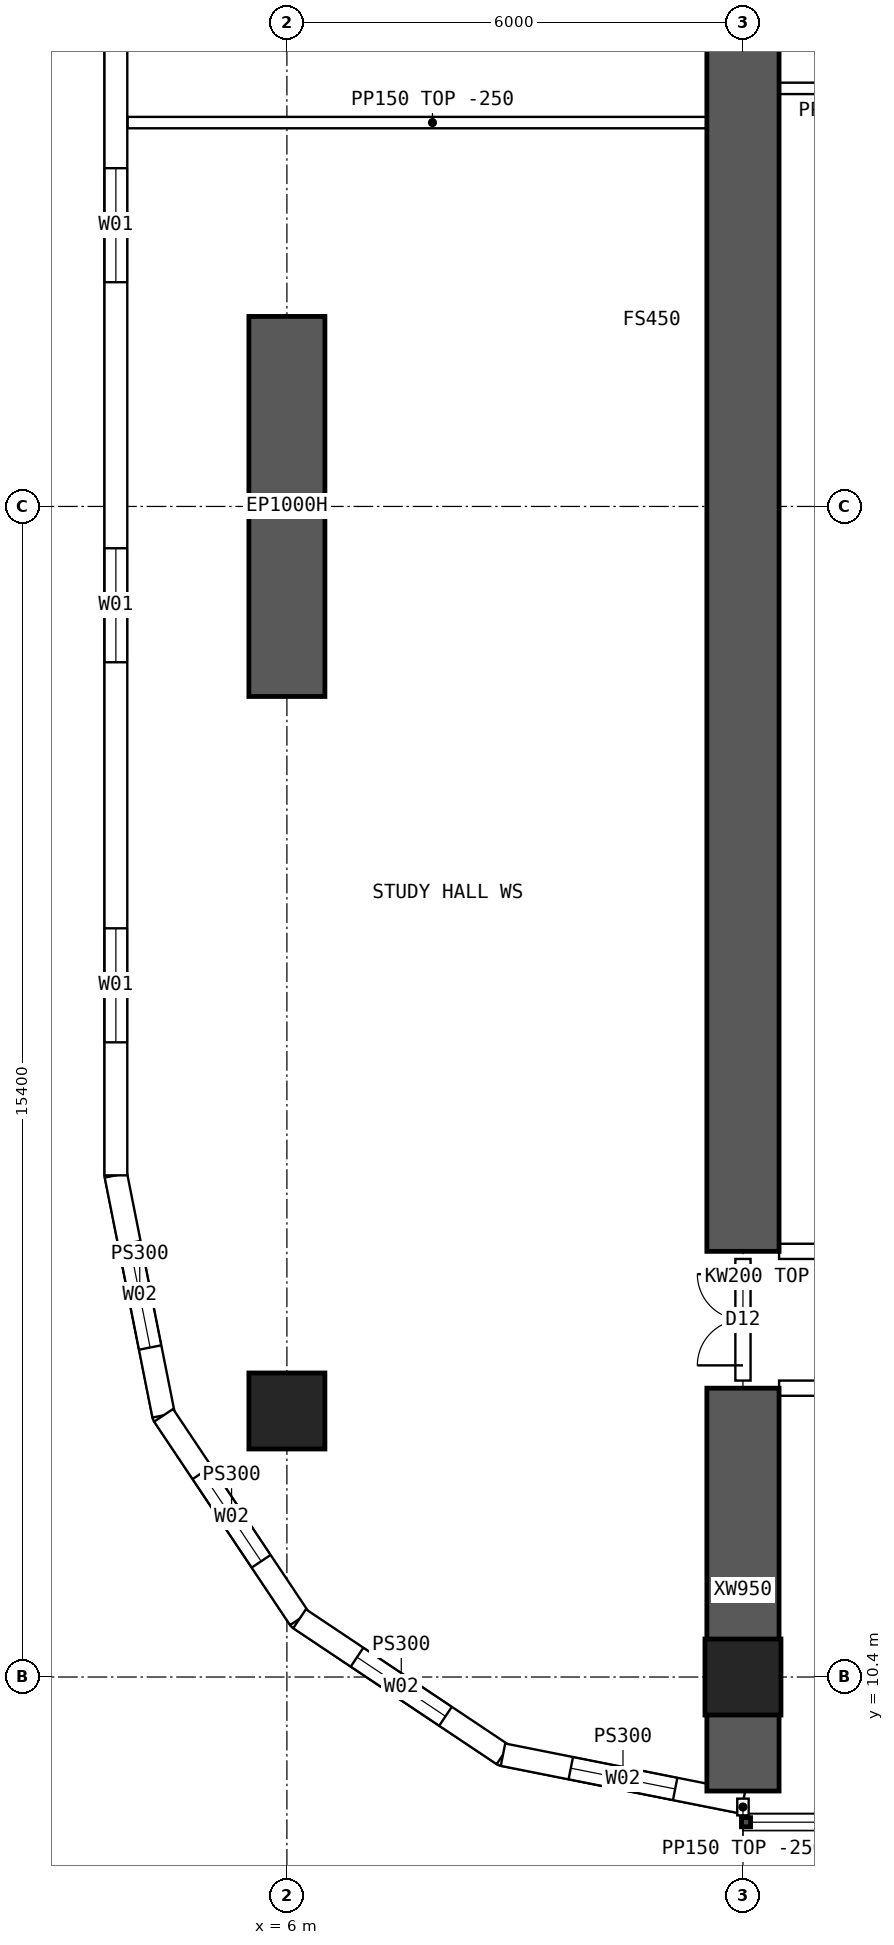
"""IFC4 building model, lengths in metres.
Left out: names, types, materials, properties, quantities, classifications, styles, units other than length and angle.
Written with IfcOpenShell. Run it as: python <this file> out.ifc"""

import sys

from ifc_helpers import new_model, si_unit, direction, frame, frame_2d, origin, origin_2d, place, context, subcontext, project, spatial, polyline, rectangle, hollow_rectangle, outline, extrude, element, fill, save


model = new_model("IFC4")
c1 = context("Model", 3, precision=1e-05, world=origin(), true_north=direction((0.0, 1.0)))
c2 = subcontext(c1, "Body", "Model", "MODEL_VIEW")
j1 = project(units=[si_unit("LENGTHUNIT", "METRE"), si_unit("PLANEANGLEUNIT", "RADIAN")], contexts=[c1])
p1 = place(None, origin())
s1 = spatial("IfcSite", under=j1, at=p1, CompositionType="ELEMENT")
p2 = place(p1, origin())
s2 = spatial("IfcBuilding", under=s1, at=p2, CompositionType="ELEMENT")
p3 = place(p2, frame((0.0, 0.0, 99.4)))
s3 = spatial("IfcBuildingStorey", under=s2, at=p3, CompositionType="ELEMENT", Elevation=99.4)
for number, where, z_axis, x_axis in (
    (1, (12.0, 10.4, 0.0), (0.0, 0.0, 1.0), (1.0, 0.0, 0.0)),
    (2, (6.0, 13.9, 0.0), (0.0, 0.0, 1.0), (1.0, 0.0, 0.0)),
):
    element("IfcColumn", number, at=place(p3, frame(where, z_axis=z_axis, x_axis=x_axis)), inside=s3, PredefinedType="COLUMN", context=c2, shape_type="SweptSolid", body=[
        extrude(hollow_rectangle(XDim=1.0, YDim=1.0, WallThickness=0.1, at=origin_2d()), origin(), (0.0, 0.0, 1.0), 3.75),
    ])
p4 = place(p3, frame((6.0, 23.3, 0.0), z_axis=(0.0, 0.0, 1.0), x_axis=(0.0, 1.0, 0.0)))
e3 = element("IfcWall", 3, at=p4, inside=s3, PredefinedType="SHEAR", context=c2, shape_type="SweptSolid", body=[
    extrude(rectangle(XDim=5.0, YDim=1.0, at=frame_2d((2.5, 0.0))), origin(), (0.0, 0.0, 1.0), 3.75),
])
p5 = place(p3, frame((12.0, 8.9, 0.0), z_axis=(0.0, 0.0, 1.0), x_axis=(0.0, 1.0, 0.0)))
e4 = element("IfcWall", 4, at=p5, inside=s3, PredefinedType="SHEAR", context=c2, shape_type="SweptSolid", body=[
    extrude(rectangle(XDim=5.3, YDim=0.95, at=frame_2d((2.65, 0.0))), origin(), (0.0, 0.0, 1.0), 3.75),
])
p6 = place(p3, frame((12.0, 16.0, 0.0), z_axis=(0.0, 0.0, 1.0), x_axis=(0.0, 1.0, 0.0)))
e5 = element("IfcWall", 5, at=p6, inside=s3, PredefinedType="SHEAR", context=c2, shape_type="SweptSolid", body=[
    extrude(rectangle(XDim=32.0, YDim=0.95, at=frame_2d((16.0, 0.0))), origin(), (0.0, 0.0, 1.0), 3.75),
])
p7 = place(p3, frame((3.75, 47.0, 0.0), z_axis=(0.0, 0.0, 1.0), x_axis=(0.0, -1.0, 0.0)))
e6 = element("IfcWall", 6, at=p7, inside=s3, PredefinedType="SOLIDWALL", context=c2, shape_type="SweptSolid", body=[
    extrude(outline(polyline([(-0.015, -0.15), (30.015, -0.15), (29.985, 0.15), (0.015, 0.15), (-0.015, -0.15)])), origin(), (0.0, 0.0, 1.0), 3.5),
])
p8 = place(p7, frame((1.75, 0.0, 0.9)))
e7 = element("IfcOpeningElement", 7, at=p8, cuts=e6, PredefinedType="OPENING", context=c2, shape_type="SweptSolid", body=[
    extrude(rectangle(XDim=1.5, YDim=2.0, at=frame_2d((0.75, 1.0))), frame((0.0, 0.16, 0.0), z_axis=(0.0, -1.0, 0.0), x_axis=(1.0, 0.0, 0.0)), (0.0, 0.0, 1.0), 0.32),
])
p9 = place(p7, frame((6.75, 0.0, 0.9)))
e8 = element("IfcOpeningElement", 8, at=p9, cuts=e6, PredefinedType="OPENING", context=c2, shape_type="SweptSolid", body=[
    extrude(rectangle(XDim=1.5, YDim=2.0, at=frame_2d((0.75, 1.0))), frame((0.0, 0.16, 0.0), z_axis=(0.0, -1.0, 0.0), x_axis=(1.0, 0.0, 0.0)), (0.0, 0.0, 1.0), 0.32),
])
p10 = place(p7, frame((11.75, 0.0, 0.9)))
e9 = element("IfcOpeningElement", 9, at=p10, cuts=e6, PredefinedType="OPENING", context=c2, shape_type="SweptSolid", body=[
    extrude(rectangle(XDim=1.5, YDim=2.0, at=frame_2d((0.75, 1.0))), frame((0.0, 0.16, 0.0), z_axis=(0.0, -1.0, 0.0), x_axis=(1.0, 0.0, 0.0)), (0.0, 0.0, 1.0), 0.32),
])
p11 = place(p7, frame((16.75, 0.0, 0.9)))
e10 = element("IfcOpeningElement", 10, at=p11, cuts=e6, PredefinedType="OPENING", context=c2, shape_type="SweptSolid", body=[
    extrude(rectangle(XDim=1.5, YDim=2.0, at=frame_2d((0.75, 1.0))), frame((0.0, 0.16, 0.0), z_axis=(0.0, -1.0, 0.0), x_axis=(1.0, 0.0, 0.0)), (0.0, 0.0, 1.0), 0.32),
])
p12 = place(p7, frame((21.75, 0.0, 0.9)))
e11 = element("IfcOpeningElement", 11, at=p12, cuts=e6, PredefinedType="OPENING", context=c2, shape_type="SweptSolid", body=[
    extrude(rectangle(XDim=1.5, YDim=2.0, at=frame_2d((0.75, 1.0))), frame((0.0, 0.16, 0.0), z_axis=(0.0, -1.0, 0.0), x_axis=(1.0, 0.0, 0.0)), (0.0, 0.0, 1.0), 0.32),
])
p13 = place(p7, frame((26.75, 0.0, 0.9)))
e12 = element("IfcOpeningElement", 12, at=p13, cuts=e6, PredefinedType="OPENING", context=c2, shape_type="SweptSolid", body=[
    extrude(rectangle(XDim=1.5, YDim=2.0, at=frame_2d((0.75, 1.0))), frame((0.0, 0.16, 0.0), z_axis=(0.0, -1.0, 0.0), x_axis=(1.0, 0.0, 0.0)), (0.0, 0.0, 1.0), 0.32),
])
p14 = place(p3, frame((3.75, 17.0, 0.0), z_axis=(0.0, 0.0, 1.0), x_axis=(0.195080412259, -0.980787251524, 0.0)))
e13 = element("IfcWall", 13, at=p14, inside=s3, PredefinedType="SOLIDWALL", context=c2, shape_type="SweptSolid", body=[
    extrude(outline(polyline([(-0.015, -0.15), (3.249, -0.15), (3.189, 0.15), (0.015, 0.15), (-0.015, -0.15)])), origin(), (0.0, 0.0, 1.0), 3.5),
])
p15 = place(p14, frame((0.909, 0.0, 0.9)))
e14 = element("IfcOpeningElement", 14, at=p15, cuts=e13, PredefinedType="OPENING", context=c2, shape_type="SweptSolid", body=[
    extrude(rectangle(XDim=1.4, YDim=1.8, at=frame_2d((0.7, 0.9))), frame((0.0, 0.16, 0.0), z_axis=(0.0, -1.0, 0.0), x_axis=(1.0, 0.0, 0.0)), (0.0, 0.0, 1.0), 0.32),
])
p16 = place(p3, frame((4.378, 13.843, 0.0), z_axis=(0.0, 0.0, 1.0), x_axis=(0.555609954424, -0.831443069936, 0.0)))
e15 = element("IfcWall", 15, at=p16, inside=s3, PredefinedType="SOLIDWALL", context=c2, shape_type="SweptSolid", body=[
    extrude(outline(polyline([(-0.03, -0.15), (3.249, -0.15), (3.189, 0.15), (0.03, 0.15), (-0.03, -0.15)])), origin(), (0.0, 0.0, 1.0), 3.5),
])
p17 = place(p16, frame((0.909, 0.0, 0.9)))
e16 = element("IfcOpeningElement", 16, at=p17, cuts=e15, PredefinedType="OPENING", context=c2, shape_type="SweptSolid", body=[
    extrude(rectangle(XDim=1.4, YDim=1.8, at=frame_2d((0.7, 0.9))), frame((0.0, 0.16, 0.0), z_axis=(0.0, -1.0, 0.0), x_axis=(1.0, 0.0, 0.0)), (0.0, 0.0, 1.0), 0.32),
])
p18 = place(p3, frame((6.167, 11.167, 0.0), z_axis=(0.0, 0.0, 1.0), x_axis=(0.831443069936, -0.555609954424, 0.0)))
e17 = element("IfcWall", 17, at=p18, inside=s3, PredefinedType="SOLIDWALL", context=c2, shape_type="SweptSolid", body=[
    extrude(outline(polyline([(-0.03, -0.15), (3.249, -0.15), (3.189, 0.15), (0.03, 0.15), (-0.03, -0.15)])), origin(), (0.0, 0.0, 1.0), 3.5),
])
p19 = place(p18, frame((0.909, 0.0, 0.9)))
e18 = element("IfcOpeningElement", 18, at=p19, cuts=e17, PredefinedType="OPENING", context=c2, shape_type="SweptSolid", body=[
    extrude(rectangle(XDim=1.4, YDim=1.8, at=frame_2d((0.7, 0.9))), frame((0.0, 0.16, 0.0), z_axis=(0.0, -1.0, 0.0), x_axis=(1.0, 0.0, 0.0)), (0.0, 0.0, 1.0), 0.32),
])
p20 = place(p3, frame((8.843, 9.378, 0.0), z_axis=(0.0, 0.0, 1.0), x_axis=(0.980787251524, -0.195080412259, 0.0)))
e19 = element("IfcWall", 19, at=p20, inside=s3, PredefinedType="SOLIDWALL", context=c2, shape_type="SweptSolid", body=[
    extrude(outline(polyline([(-0.03, -0.15), (3.249, -0.15), (3.189, 0.15), (0.03, 0.15), (-0.03, -0.15)])), origin(), (0.0, 0.0, 1.0), 3.5),
])
p21 = place(p20, frame((0.909, 0.0, 0.9)))
e20 = element("IfcOpeningElement", 20, at=p21, cuts=e19, PredefinedType="OPENING", context=c2, shape_type="SweptSolid", body=[
    extrude(rectangle(XDim=1.4, YDim=1.8, at=frame_2d((0.7, 0.9))), frame((0.0, 0.16, 0.0), z_axis=(0.0, -1.0, 0.0), x_axis=(1.0, 0.0, 0.0)), (0.0, 0.0, 1.0), 0.32),
])
p22 = place(p3, frame((12.475, 14.2, 0.0), z_axis=(0.0, 0.0, 1.0), x_axis=(1.0, 0.0, 0.0)))
e21 = element("IfcWall", 21, at=p22, inside=s3, PredefinedType="SOLIDWALL", context=c2, shape_type="SweptSolid", body=[
    extrude(outline(polyline([(0.0, 0.0), (5.05, 0.0), (5.05, 3.1), (0.0, 3.1), (0.0, 0.0)])), frame((0.0, 0.1, 0.0), z_axis=(0.0, -1.0, 0.0), x_axis=(1.0, 0.0, 0.0)), (0.0, 0.0, 1.0), 0.2),
])
p23 = place(p22, frame((0.6, 0.0, 0.0)))
e22 = element("IfcOpeningElement", 22, at=p23, cuts=e21, PredefinedType="OPENING", context=c2, shape_type="SweptSolid", body=[
    extrude(rectangle(XDim=1.0, YDim=2.1, at=frame_2d((0.5, 1.05))), frame((0.0, 0.11, 0.0), z_axis=(0.0, -1.0, 0.0), x_axis=(1.0, 0.0, 0.0)), (0.0, 0.0, 1.0), 0.22),
])
p24 = place(p3, frame((12.475, 16.0, 0.0), z_axis=(0.0, 0.0, 1.0), x_axis=(1.0, 0.0, 0.0)))
e23 = element("IfcWall", 23, at=p24, inside=s3, PredefinedType="SOLIDWALL", context=c2, shape_type="SweptSolid", body=[
    extrude(rectangle(XDim=5.05, YDim=0.2, at=frame_2d((2.525, 0.0))), origin(), (0.0, 0.0, 1.0), 3.5),
])
p25 = place(p24, frame((3.325, 0.0, 0.0)))
e24 = element("IfcOpeningElement", 24, at=p25, cuts=e23, PredefinedType="OPENING", context=c2, shape_type="SweptSolid", body=[
    extrude(rectangle(XDim=1.6, YDim=2.1, at=frame_2d((0.8, 1.05))), frame((0.0, 0.11, 0.0), z_axis=(0.0, -1.0, 0.0), x_axis=(1.0, 0.0, 0.0)), (0.0, 0.0, 1.0), 0.22),
])
p26 = place(p3, frame((12.0, 31.3, 0.0), z_axis=(0.0, 0.0, 1.0), x_axis=(1.0, 0.0, 0.0)))
e25 = element("IfcWall", 25, at=p26, inside=s3, PredefinedType="PARTITIONING", context=c2, shape_type="SweptSolid", body=[
    extrude(rectangle(XDim=3.6, YDim=0.15, at=frame_2d((1.8, 0.0))), origin(), (0.0, 0.0, 1.0), 3.5),
])
p27 = place(p3, frame((3.905, 30.85, 0.0), z_axis=(0.0, 0.0, 1.0), x_axis=(1.0, 0.0, 0.0)))
e26 = element("IfcWall", 26, at=p27, inside=s3, PredefinedType="PARTITIONING", context=c2, shape_type="SweptSolid", body=[
    extrude(outline(polyline([(0.0, 0.0), (8.02, 0.0), (8.02, 3.5), (2.397, 3.5), (2.395, 3.05), (1.797, 3.05), (1.795, 3.5), (0.0, 3.5), (0.0, 0.0)])), frame((0.0, 0.075, 0.0), z_axis=(0.0, -1.0, 0.0), x_axis=(1.0, 0.0, 0.0)), (0.0, 0.0, 1.0), 0.15),
])
p28 = place(p3, frame((12.0, 14.3, 0.0), z_axis=(0.0, 0.0, 1.0), x_axis=(0.0, 1.0, 0.0)))
e27 = element("IfcWall", 27, at=p28, inside=s3, PredefinedType="SOLIDWALL", context=c2, shape_type="SweptSolid", body=[
    extrude(outline(polyline([(0.0, 0.0), (1.6, 0.0), (1.6, 3.1), (0.0, 3.1), (0.0, 0.0)])), frame((0.0, 0.1, 0.0), z_axis=(0.0, -1.0, 0.0), x_axis=(1.0, 0.0, 0.0)), (0.0, 0.0, 1.0), 0.2),
])
p29 = place(p28, frame((0.2, 0.0, 0.0)))
e28 = element("IfcOpeningElement", 28, at=p29, cuts=e27, PredefinedType="OPENING", context=c2, shape_type="SweptSolid", body=[
    extrude(rectangle(XDim=1.2, YDim=2.1, at=frame_2d((0.6, 1.05))), frame((0.0, 0.11, 0.0), z_axis=(0.0, -1.0, 0.0), x_axis=(1.0, 0.0, 0.0)), (0.0, 0.0, 1.0), 0.22),
])
p30 = place(p3, frame((12.0, 8.8, 0.0), z_axis=(0.0, 0.0, 1.0), x_axis=(0.0, -1.0, 0.0)))
e29 = element("IfcWall", 29, at=p30, inside=s3, PredefinedType="PARTITIONING", context=c2, shape_type="SweptSolid", body=[
    extrude(rectangle(XDim=0.22, YDim=0.15, at=frame_2d((0.11, 0.0))), origin(), (0.0, 0.0, 1.0), 3.5),
])
p31 = place(p11, origin())
e30 = element("IfcWindow", 30, at=p31, inside=s3, PartitioningType="SINGLE_PANEL", PredefinedType="WINDOW", context=c2, shape_type="SweptSolid", body=[
    extrude(rectangle(XDim=1.5, YDim=2.0, at=frame_2d((0.75, 1.0))), frame((0.0, 0.03, 0.0), z_axis=(0.0, -1.0, 0.0), x_axis=(1.0, 0.0, 0.0)), (0.0, 0.0, 1.0), 0.06),
])
fill(e10, e30)
p32 = place(p12, origin())
e31 = element("IfcWindow", 31, at=p32, inside=s3, PartitioningType="SINGLE_PANEL", PredefinedType="WINDOW", context=c2, shape_type="SweptSolid", body=[
    extrude(rectangle(XDim=1.5, YDim=2.0, at=frame_2d((0.75, 1.0))), frame((0.0, 0.03, 0.0), z_axis=(0.0, -1.0, 0.0), x_axis=(1.0, 0.0, 0.0)), (0.0, 0.0, 1.0), 0.06),
])
fill(e11, e31)
p33 = place(p13, origin())
e32 = element("IfcWindow", 32, at=p33, inside=s3, PartitioningType="SINGLE_PANEL", PredefinedType="WINDOW", context=c2, shape_type="SweptSolid", body=[
    extrude(rectangle(XDim=1.5, YDim=2.0, at=frame_2d((0.75, 1.0))), frame((0.0, 0.03, 0.0), z_axis=(0.0, -1.0, 0.0), x_axis=(1.0, 0.0, 0.0)), (0.0, 0.0, 1.0), 0.06),
])
fill(e12, e32)
p34 = place(p15, origin())
e33 = element("IfcWindow", 33, at=p34, inside=s3, PartitioningType="SINGLE_PANEL", PredefinedType="WINDOW", context=c2, shape_type="SweptSolid", body=[
    extrude(rectangle(XDim=1.4, YDim=1.8, at=frame_2d((0.7, 0.9))), frame((0.0, 0.03, 0.0), z_axis=(0.0, -1.0, 0.0), x_axis=(1.0, 0.0, 0.0)), (0.0, 0.0, 1.0), 0.06),
])
fill(e14, e33)
p35 = place(p17, origin())
e34 = element("IfcWindow", 34, at=p35, inside=s3, PartitioningType="SINGLE_PANEL", PredefinedType="WINDOW", context=c2, shape_type="SweptSolid", body=[
    extrude(rectangle(XDim=1.4, YDim=1.8, at=frame_2d((0.7, 0.9))), frame((0.0, 0.03, 0.0), z_axis=(0.0, -1.0, 0.0), x_axis=(1.0, 0.0, 0.0)), (0.0, 0.0, 1.0), 0.06),
])
fill(e16, e34)
p36 = place(p19, origin())
e35 = element("IfcWindow", 35, at=p36, inside=s3, PartitioningType="SINGLE_PANEL", PredefinedType="WINDOW", context=c2, shape_type="SweptSolid", body=[
    extrude(rectangle(XDim=1.4, YDim=1.8, at=frame_2d((0.7, 0.9))), frame((0.0, 0.03, 0.0), z_axis=(0.0, -1.0, 0.0), x_axis=(1.0, 0.0, 0.0)), (0.0, 0.0, 1.0), 0.06),
])
fill(e18, e35)
p37 = place(p21, origin())
e36 = element("IfcWindow", 36, at=p37, inside=s3, PartitioningType="SINGLE_PANEL", PredefinedType="WINDOW", context=c2, shape_type="SweptSolid", body=[
    extrude(rectangle(XDim=1.4, YDim=1.8, at=frame_2d((0.7, 0.9))), frame((0.0, 0.03, 0.0), z_axis=(0.0, -1.0, 0.0), x_axis=(1.0, 0.0, 0.0)), (0.0, 0.0, 1.0), 0.06),
])
fill(e20, e36)
p38 = place(p29, origin())
e37 = element("IfcDoor", 37, at=p38, inside=s3, OperationType="DOUBLE_DOOR_SINGLE_SWING", PredefinedType="DOOR", context=c2, shape_type="SweptSolid", body=[
    extrude(rectangle(XDim=1.2, YDim=2.1, at=frame_2d((0.6, 1.05))), frame((0.0, 0.025, 0.0), z_axis=(0.0, -1.0, 0.0), x_axis=(1.0, 0.0, 0.0)), (0.0, 0.0, 1.0), 0.05),
])
fill(e28, e37)
save(model, sys.argv[1])
